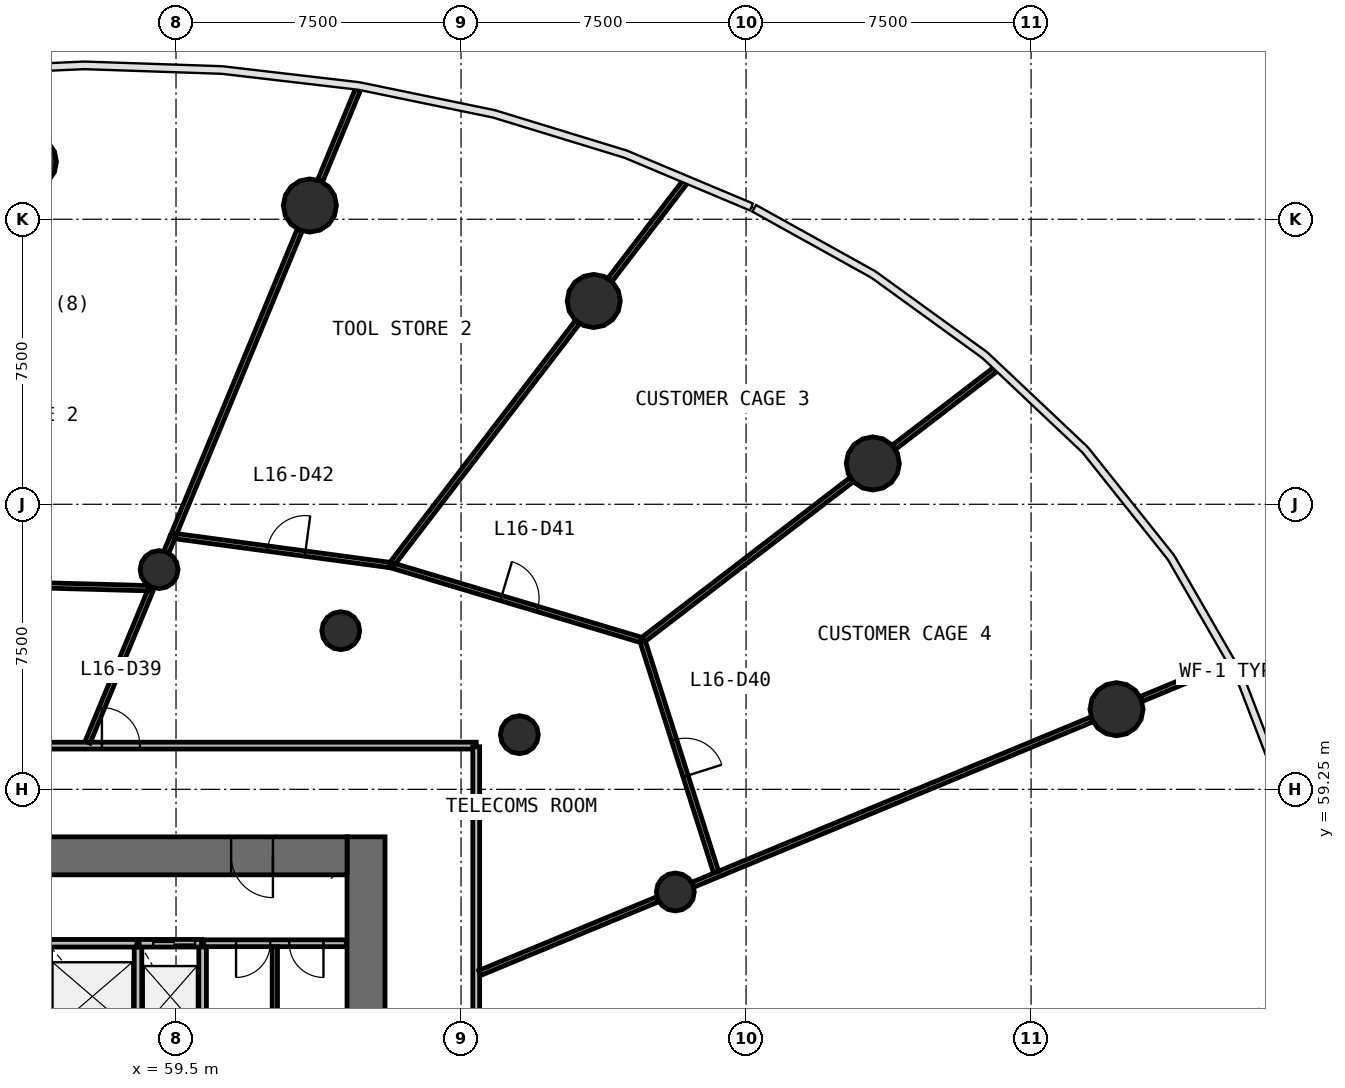
"""IFC4 building model, lengths in metres.
Left out: names, types, materials, properties, quantities, classifications, styles, units other than length and angle.
Written with IfcOpenShell. Run it as: python <this file> out.ifc"""

import sys

from ifc_helpers import new_model, si_unit, direction, frame, frame_2d, origin, origin_2d, place, context, subcontext, project, spatial, rectangle, circle, extrude, source, transform, mapped, element, fill, save


model = new_model("IFC4")
c1 = context("Model", 3, precision=1e-05, world=origin(), true_north=direction((0.0, 1.0)))
c2 = subcontext(c1, "Body", "Model", "MODEL_VIEW")
j1 = project(units=[si_unit("LENGTHUNIT", "METRE"), si_unit("PLANEANGLEUNIT", "RADIAN")], contexts=[c1])
p1 = place(None, origin())
s1 = spatial("IfcSite", under=j1, at=p1, CompositionType="ELEMENT")
p2 = place(p1, origin())
s2 = spatial("IfcBuilding", under=s1, at=p2, CompositionType="ELEMENT")
p3 = place(p2, frame((0.0, 0.0, 71.0)))
s3 = spatial("IfcBuildingStorey", under=s2, at=p3, CompositionType="ELEMENT", Elevation=71.0)
p4 = place(p3, frame((64.5, 38.0, 0.0), z_axis=(0.0, 0.0, 1.0), x_axis=(0.0, 1.0, 0.0)))
e1 = element("IfcWall", 1, at=p4, inside=s3, PredefinedType="SHEAR", context=c2, shape_type="SweptSolid", body=[
    extrude(rectangle(XDim=20.0, YDim=1.0, at=frame_2d((10.0, 0.0))), origin(), (0.0, 0.0, 1.0), 4.4),
])
p5 = place(p4, frame((9.1, 0.0, 0.0)))
e2 = element("IfcOpeningElement", 2, at=p5, cuts=e1, PredefinedType="OPENING", context=c2, shape_type="SweptSolid", body=[
    extrude(rectangle(XDim=1.8, YDim=2.1, at=frame_2d((0.9, 1.05))), frame((0.0, 0.51, 0.0), z_axis=(0.0, -1.0, 0.0), x_axis=(1.0, 0.0, 0.0)), (0.0, 0.0, 1.0), 1.02),
])
p6 = place(p3, frame((64.0, 57.5, 0.0), z_axis=(0.0, 0.0, 1.0), x_axis=(-1.0, 0.0, 0.0)))
e3 = element("IfcWall", 3, at=p6, inside=s3, PredefinedType="SHEAR", context=c2, shape_type="SweptSolid", body=[
    extrude(rectangle(XDim=24.0, YDim=1.0, at=frame_2d((12.0, 0.0))), origin(), (0.0, 0.0, 1.0), 4.4),
])
p7 = place(p6, frame((21.45, 0.0, 0.0)))
e4 = element("IfcOpeningElement", 4, at=p7, cuts=e3, PredefinedType="OPENING", context=c2, shape_type="SweptSolid", body=[
    extrude(rectangle(XDim=1.1, YDim=2.1, at=frame_2d((0.55, 1.05))), frame((0.0, 0.51, 0.0), z_axis=(0.0, -1.0, 0.0), x_axis=(1.0, 0.0, 0.0)), (0.0, 0.0, 1.0), 1.02),
])
p8 = place(p6, frame((1.95, 0.0, 0.0)))
e5 = element("IfcOpeningElement", 5, at=p8, cuts=e3, PredefinedType="OPENING", context=c2, shape_type="SweptSolid", body=[
    extrude(rectangle(XDim=1.1, YDim=2.1, at=frame_2d((0.55, 1.05))), frame((0.0, 0.51, 0.0), z_axis=(0.0, -1.0, 0.0), x_axis=(1.0, 0.0, 0.0)), (0.0, 0.0, 1.0), 1.02),
])
m1 = source(origin(), c2, "Body", "SweptSolid", [
    extrude(circle(Radius=0.7, at=origin_2d()), origin(), (0.0, 0.0, 1.0), 4.4),
])
for number, where, z_axis, x_axis in (
    (6, (84.249, 61.358, 0.0), (0.0, 0.0, 1.0), (1.0, 0.0, 0.0)),
    (7, (77.836, 67.824, 0.0), (0.0, 0.0, 1.0), (1.0, 0.0, 0.0)),
    (8, (70.492, 72.1, 0.0), (0.0, 0.0, 1.0), (1.0, 0.0, 0.0)),
    (9, (63.023, 74.611, 0.0), (0.0, 0.0, 1.0), (1.0, 0.0, 0.0)),
    (10, (55.655, 75.761, 0.0), (0.0, 0.0, 1.0), (1.0, 0.0, 0.0)),
):
    element("IfcColumn", number, at=place(p3, frame(where, z_axis=z_axis, x_axis=x_axis)), inside=s3, PredefinedType="COLUMN", context=c2, shape_type="MappedRepresentation", body=[
        mapped(m1, transform((0.0, 0.0, 0.0), scale=1.0)),
    ])
m2 = source(origin(), c2, "Body", "SweptSolid", [
    extrude(circle(Radius=0.5, at=origin_2d()), origin(), (0.0, 0.0, 1.0), 4.4),
])
for number, where, z_axis, x_axis in (
    (11, (72.639, 56.549, 0.0), (0.0, 0.0, 1.0), (1.0, 0.0, 0.0)),
    (12, (68.535, 60.688, 0.0), (0.0, 0.0, 1.0), (1.0, 0.0, 0.0)),
    (13, (63.835, 63.424, 0.0), (0.0, 0.0, 1.0), (1.0, 0.0, 0.0)),
    (14, (59.055, 65.031, 0.0), (0.0, 0.0, 1.0), (1.0, 0.0, 0.0)),
):
    element("IfcColumn", number, at=place(p3, frame(where, z_axis=z_axis, x_axis=x_axis)), inside=s3, PredefinedType="COLUMN", context=c2, shape_type="MappedRepresentation", body=[
        mapped(m2, transform((0.0, 0.0, 0.0), scale=1.0)),
    ])
for number, where, z_axis, x_axis in (
    (15, (58.5, 52.4, 0.0), (0.0, 0.0, 1.0), (0.0, 1.0, 0.0)),
    (16, (60.2, 52.4, 0.0), (0.0, 0.0, 1.0), (0.0, 1.0, 0.0)),
):
    element("IfcWall", number, at=place(p3, frame(where, z_axis=z_axis, x_axis=x_axis)), inside=s3, PredefinedType="SOLIDWALL", context=c2, shape_type="SweptSolid", body=[
        extrude(rectangle(XDim=2.8, YDim=0.2, at=frame_2d((1.4, 0.0))), origin(), (0.0, 0.0, 1.0), 3.9),
    ])
p9 = place(p3, frame((58.47, 55.2, 0.0), z_axis=(0.0, 0.0, 1.0), x_axis=(-1.0, 0.0, 0.0)))
e17 = element("IfcWall", 17, at=p9, inside=s3, PredefinedType="SOLIDWALL", context=c2, shape_type="SweptSolid", body=[
    extrude(rectangle(XDim=2.34, YDim=0.2, at=frame_2d((1.17, 0.0))), origin(), (0.0, 0.0, 1.0), 3.9),
])
p10 = place(p3, frame((60.17, 55.2, 0.0), z_axis=(0.0, 0.0, 1.0), x_axis=(-1.0, 0.0, 0.0)))
e18 = element("IfcWall", 18, at=p10, inside=s3, PredefinedType="SOLIDWALL", context=c2, shape_type="SweptSolid", body=[
    extrude(rectangle(XDim=1.64, YDim=0.2, at=frame_2d((0.82, 0.0))), origin(), (0.0, 0.0, 1.0), 3.9),
])
p11 = place(p10, frame((0.17, 0.0, 0.0)))
e19 = element("IfcOpeningElement", 19, at=p11, cuts=e18, PredefinedType="OPENING", context=c2, shape_type="SweptSolid", body=[
    extrude(rectangle(XDim=1.1, YDim=2.1, at=frame_2d((0.55, 1.05))), frame((0.0, 0.11, 0.0), z_axis=(0.0, -1.0, 0.0), x_axis=(1.0, 0.0, 0.0)), (0.0, 0.0, 1.0), 0.22),
])
p12 = place(p3, frame((36.6, 60.4, 0.0), z_axis=(0.0, 0.0, 1.0), x_axis=(1.0, 0.0, 0.0)))
e20 = element("IfcWall", 20, at=p12, inside=s3, PredefinedType="PARTITIONING", context=c2, shape_type="SweptSolid", body=[
    extrude(rectangle(XDim=30.8, YDim=0.18, at=frame_2d((15.4, 0.0))), origin(), (0.0, 0.0, 1.0), 3.0),
])
p13 = place(p12, frame((9.05, 0.0, 0.0)))
e21 = element("IfcOpeningElement", 21, at=p13, cuts=e20, PredefinedType="OPENING", context=c2, shape_type="SweptSolid", body=[
    extrude(rectangle(XDim=0.9, YDim=2.1, at=frame_2d((0.45, 1.05))), frame((0.0, 0.1, 0.0), z_axis=(0.0, -1.0, 0.0), x_axis=(1.0, 0.0, 0.0)), (0.0, 0.0, 1.0), 0.2),
])
p14 = place(p12, frame((6.05, 0.0, 0.0)))
e22 = element("IfcOpeningElement", 22, at=p14, cuts=e20, PredefinedType="OPENING", context=c2, shape_type="SweptSolid", body=[
    extrude(rectangle(XDim=0.9, YDim=2.1, at=frame_2d((0.45, 1.05))), frame((0.0, 0.1, 0.0), z_axis=(0.0, -1.0, 0.0), x_axis=(1.0, 0.0, 0.0)), (0.0, 0.0, 1.0), 0.2),
])
p15 = place(p12, frame((2.45, 0.0, 0.0)))
e23 = element("IfcOpeningElement", 23, at=p15, cuts=e20, PredefinedType="OPENING", context=c2, shape_type="SweptSolid", body=[
    extrude(rectangle(XDim=0.9, YDim=2.1, at=frame_2d((0.45, 1.05))), frame((0.0, 0.1, 0.0), z_axis=(0.0, -1.0, 0.0), x_axis=(1.0, 0.0, 0.0)), (0.0, 0.0, 1.0), 0.2),
])
p16 = place(p12, frame((20.95, 0.0, 0.0)))
e24 = element("IfcOpeningElement", 24, at=p16, cuts=e20, PredefinedType="OPENING", context=c2, shape_type="SweptSolid", body=[
    extrude(rectangle(XDim=1.0, YDim=2.1, at=frame_2d((0.5, 1.05))), frame((0.0, 0.1, 0.0), z_axis=(0.0, -1.0, 0.0), x_axis=(1.0, 0.0, 0.0)), (0.0, 0.0, 1.0), 0.2),
])
p17 = place(p12, frame((14.95, 0.0, 0.0)))
e25 = element("IfcOpeningElement", 25, at=p17, cuts=e20, PredefinedType="OPENING", context=c2, shape_type="SweptSolid", body=[
    extrude(rectangle(XDim=1.0, YDim=2.1, at=frame_2d((0.5, 1.05))), frame((0.0, 0.1, 0.0), z_axis=(0.0, -1.0, 0.0), x_axis=(1.0, 0.0, 0.0)), (0.0, 0.0, 1.0), 0.2),
])
p18 = place(p12, frame((12.55, 0.0, 0.0)))
e26 = element("IfcOpeningElement", 26, at=p18, cuts=e20, PredefinedType="OPENING", context=c2, shape_type="SweptSolid", body=[
    extrude(rectangle(XDim=1.0, YDim=2.1, at=frame_2d((0.5, 1.05))), frame((0.0, 0.1, 0.0), z_axis=(0.0, -1.0, 0.0), x_axis=(1.0, 0.0, 0.0)), (0.0, 0.0, 1.0), 0.2),
])
p19 = place(p3, frame((67.4, 60.37, 0.0), z_axis=(0.0, 0.0, 1.0), x_axis=(0.0, -1.0, 0.0)))
e27 = element("IfcWall", 27, at=p19, inside=s3, PredefinedType="PARTITIONING", context=c2, shape_type="SweptSolid", body=[
    extrude(rectangle(XDim=23.583, YDim=0.18, at=frame_2d((11.791, 0.0))), origin(), (0.0, 0.0, 1.0), 3.0),
])
p20 = place(p19, frame((14.732, 0.0, 0.0)))
e28 = element("IfcOpeningElement", 28, at=p20, cuts=e27, PredefinedType="OPENING", context=c2, shape_type="SweptSolid", body=[
    extrude(rectangle(XDim=1.0, YDim=2.1, at=frame_2d((0.5, 1.05))), frame((0.0, 0.1, 0.0), z_axis=(0.0, -1.0, 0.0), x_axis=(1.0, 0.0, 0.0)), (0.0, 0.0, 1.0), 0.2),
])
p21 = place(p19, frame((11.333, 0.0, 0.0)))
e29 = element("IfcOpeningElement", 29, at=p21, cuts=e27, PredefinedType="OPENING", context=c2, shape_type="SweptSolid", body=[
    extrude(rectangle(XDim=1.0, YDim=2.1, at=frame_2d((0.5, 1.05))), frame((0.0, 0.1, 0.0), z_axis=(0.0, -1.0, 0.0), x_axis=(1.0, 0.0, 0.0)), (0.0, 0.0, 1.0), 0.2),
])
p22 = place(p3, frame((63.98, 55.2, 0.0), z_axis=(0.0, 0.0, 1.0), x_axis=(-1.0, 0.0, 0.0)))
e30 = element("IfcWall", 30, at=p22, inside=s3, PredefinedType="PARTITIONING", context=c2, shape_type="SweptSolid", body=[
    extrude(rectangle(XDim=3.75, YDim=0.18, at=frame_2d((1.875, 0.0))), origin(), (0.0, 0.0, 1.0), 3.9),
])
p23 = place(p22, frame((2.0, 0.0, 0.0)))
e31 = element("IfcOpeningElement", 31, at=p23, cuts=e30, PredefinedType="OPENING", context=c2, shape_type="SweptSolid", body=[
    extrude(rectangle(XDim=0.9, YDim=2.1, at=frame_2d((0.45, 1.05))), frame((0.0, 0.1, 0.0), z_axis=(0.0, -1.0, 0.0), x_axis=(1.0, 0.0, 0.0)), (0.0, 0.0, 1.0), 0.2),
])
p24 = place(p22, frame((0.6, 0.0, 0.0)))
e32 = element("IfcOpeningElement", 32, at=p24, cuts=e30, PredefinedType="OPENING", context=c2, shape_type="SweptSolid", body=[
    extrude(rectangle(XDim=0.9, YDim=2.1, at=frame_2d((0.45, 1.05))), frame((0.0, 0.1, 0.0), z_axis=(0.0, -1.0, 0.0), x_axis=(1.0, 0.0, 0.0)), (0.0, 0.0, 1.0), 0.2),
])
p25 = place(p3, frame((73.106, 56.742, 0.0), z_axis=(0.0, 0.0, 1.0), x_axis=(0.923875075531, 0.382694192291, 0.0)))
e33 = element("IfcWall", 33, at=p25, inside=s3, PredefinedType="PARTITIONING", context=c2, shape_type="SweptSolid", body=[
    extrude(rectangle(XDim=11.356, YDim=0.14, at=frame_2d((5.678, 0.0))), origin(), (0.0, 0.0, 1.0), 3.0),
])
p26 = place(p3, frame((59.423, 65.92, 0.0), z_axis=(0.0, 0.0, 1.0), x_axis=(0.382676362581, 0.92388246088, 0.0)))
e34 = element("IfcWall", 34, at=p26, inside=s3, PredefinedType="PARTITIONING", context=c2, shape_type="SweptSolid", body=[
    extrude(rectangle(XDim=8.703, YDim=0.14, at=frame_2d((4.351, 0.0))), origin(), (0.0, 0.0, 1.0), 3.0),
])
p27 = place(p3, frame((65.158, 65.147, 0.0), z_axis=(0.0, 0.0, 1.0), x_axis=(0.608766021213, 0.793349816548, 0.0)))
e35 = element("IfcWall", 35, at=p27, inside=s3, PredefinedType="PARTITIONING", context=c2, shape_type="SweptSolid", body=[
    extrude(rectangle(XDim=8.059, YDim=0.14, at=frame_2d((4.029, 0.0))), origin(), (0.0, 0.0, 1.0), 3.0),
])
p28 = place(p3, frame((71.771, 63.171, 0.0), z_axis=(0.0, 0.0, 1.0), x_axis=(0.793362269214, 0.608749792433, 0.0)))
e36 = element("IfcWall", 36, at=p28, inside=s3, PredefinedType="PARTITIONING", context=c2, shape_type="SweptSolid", body=[
    extrude(rectangle(XDim=6.94, YDim=0.14, at=frame_2d((3.47, 0.0))), origin(), (0.0, 0.0, 1.0), 3.0),
])
p29 = place(p3, frame((65.229, 65.126, 0.0), z_axis=(0.0, 0.0, 1.0), x_axis=(0.95810065558, -0.286431726205, 0.0)))
e37 = element("IfcWall", 37, at=p29, inside=s3, PredefinedType="PARTITIONING", context=c2, shape_type="SweptSolid", body=[
    extrude(rectangle(XDim=6.798, YDim=0.14, at=frame_2d((3.399, 0.0))), origin(), (0.0, 0.0, 1.0), 3.0),
])
p30 = place(p29, frame((2.947, 0.0, 0.0)))
e38 = element("IfcOpeningElement", 38, at=p30, cuts=e37, PredefinedType="OPENING", context=c2, shape_type="SweptSolid", body=[
    extrude(rectangle(XDim=1.0, YDim=2.1, at=frame_2d((0.5, 1.05))), frame((0.0, 0.08, 0.0), z_axis=(0.0, -1.0, 0.0), x_axis=(1.0, 0.0, 0.0)), (0.0, 0.0, 1.0), 0.16),
])
p31 = place(p3, frame((71.78, 63.142, 0.0), z_axis=(0.0, 0.0, 1.0), x_axis=(0.303141987912, -0.952945399887, 0.0)))
e39 = element("IfcWall", 39, at=p31, inside=s3, PredefinedType="PARTITIONING", context=c2, shape_type="SweptSolid", body=[
    extrude(rectangle(XDim=6.373, YDim=0.14, at=frame_2d((3.187, 0.0))), origin(), (0.0, 0.0, 1.0), 3.0),
])
p32 = place(p31, frame((2.723, 0.0, 0.0)))
e40 = element("IfcOpeningElement", 40, at=p32, cuts=e39, PredefinedType="OPENING", context=c2, shape_type="SweptSolid", body=[
    extrude(rectangle(XDim=1.0, YDim=2.1, at=frame_2d((0.5, 1.05))), frame((0.0, 0.08, 0.0), z_axis=(0.0, -1.0, 0.0), x_axis=(1.0, 0.0, 0.0)), (0.0, 0.0, 1.0), 0.16),
])
p33 = place(p3, frame((59.494, 65.91, 0.0), z_axis=(0.0, 0.0, 1.0), x_axis=(0.991057166824, -0.133437970936, 0.0)))
e41 = element("IfcWall", 41, at=p33, inside=s3, PredefinedType="PARTITIONING", context=c2, shape_type="SweptSolid", body=[
    extrude(rectangle(XDim=5.685, YDim=0.14, at=frame_2d((2.842, 0.0))), origin(), (0.0, 0.0, 1.0), 3.0),
])
p34 = place(p33, frame((2.435, 0.0, 0.0)))
e42 = element("IfcOpeningElement", 42, at=p34, cuts=e41, PredefinedType="OPENING", context=c2, shape_type="SweptSolid", body=[
    extrude(rectangle(XDim=1.0, YDim=2.1, at=frame_2d((0.5, 1.05))), frame((0.0, 0.08, 0.0), z_axis=(0.0, -1.0, 0.0), x_axis=(1.0, 0.0, 0.0)), (0.0, 0.0, 1.0), 0.16),
])
p35 = place(p3, frame((67.49, 54.416, 0.0), z_axis=(0.0, 0.0, 1.0), x_axis=(0.923890025086, 0.382658100067, 0.0)))
e43 = element("IfcWall", 43, at=p35, inside=s3, PredefinedType="PARTITIONING", context=c2, shape_type="SweptSolid", body=[
    extrude(rectangle(XDim=5.068, YDim=0.14, at=frame_2d((2.534, 0.0))), origin(), (0.0, 0.0, 1.0), 3.0),
])
p36 = place(p3, frame((58.851, 64.54, 0.0), z_axis=(0.0, 0.0, 1.0), x_axis=(-0.999641405582, 0.026777980617, 0.0)))
e44 = element("IfcWall", 44, at=p36, inside=s3, PredefinedType="PARTITIONING", context=c2, shape_type="SweptSolid", body=[
    extrude(rectangle(XDim=4.659, YDim=0.14, at=frame_2d((2.33, 0.0))), origin(), (0.0, 0.0, 1.0), 3.0),
])
p37 = place(p3, frame((57.174, 60.49, 0.0), z_axis=(0.0, 0.0, 1.0), x_axis=(0.382647054989, 0.923894599675, 0.0)))
e45 = element("IfcWall", 45, at=p37, inside=s3, PredefinedType="PARTITIONING", context=c2, shape_type="SweptSolid", body=[
    extrude(rectangle(XDim=4.309, YDim=0.14, at=frame_2d((2.154, 0.0))), origin(), (0.0, 0.0, 1.0), 3.0),
])
p38 = place(p3, frame((78.394, 68.253, 0.0), z_axis=(0.0, 0.0, 1.0), x_axis=(0.793347702256, 0.608768776569, 0.0)))
e46 = element("IfcWall", 46, at=p38, inside=s3, PredefinedType="PARTITIONING", context=c2, shape_type="SweptSolid", body=[
    extrude(rectangle(XDim=3.358, YDim=0.14, at=frame_2d((1.679, 0.0))), origin(), (0.0, 0.0, 1.0), 3.0),
])
p39 = place(p3, frame((70.921, 72.658, 0.0), z_axis=(0.0, 0.0, 1.0), x_axis=(0.608787991926, 0.793332957141, 0.0)))
e47 = element("IfcWall", 47, at=p39, inside=s3, PredefinedType="PARTITIONING", context=c2, shape_type="SweptSolid", body=[
    extrude(rectangle(XDim=3.249, YDim=0.14, at=frame_2d((1.625, 0.0))), origin(), (0.0, 0.0, 1.0), 3.0),
])
p40 = place(p3, frame((62.1, 52.4, 0.0), z_axis=(0.0, 0.0, 1.0), x_axis=(0.0, 1.0, 0.0)))
e48 = element("IfcWall", 48, at=p40, inside=s3, PredefinedType="PARTITIONING", context=c2, shape_type="SweptSolid", body=[
    extrude(rectangle(XDim=2.71, YDim=0.14, at=frame_2d((1.355, 0.0))), origin(), (0.0, 0.0, 1.0), 3.0),
])
p41 = place(p3, frame((63.292, 75.263, 0.0), z_axis=(0.0, 0.0, 1.0), x_axis=(0.382735718693, 0.923857873072, 0.0)))
e49 = element("IfcWall", 49, at=p41, inside=s3, PredefinedType="PARTITIONING", context=c2, shape_type="SweptSolid", body=[
    extrude(rectangle(XDim=2.583, YDim=0.14, at=frame_2d((1.292, 0.0))), origin(), (0.0, 0.0, 1.0), 3.0),
])
p42 = place(p3, frame((84.9, 61.628, 0.0), z_axis=(0.0, 0.0, 1.0), x_axis=(0.92388481198, 0.382670686352, 0.0)))
e50 = element("IfcWall", 50, at=p42, inside=s3, PredefinedType="PARTITIONING", context=c2, shape_type="SweptSolid", body=[
    extrude(rectangle(XDim=2.479, YDim=0.14, at=frame_2d((1.24, 0.0))), origin(), (0.0, 0.0, 1.0), 3.0),
])
p43 = place(p3, frame((59.248, 65.498, 0.0), z_axis=(0.0, 0.0, 1.0), x_axis=(0.382705452121, 0.923870411322, 0.0)))
e51 = element("IfcWall", 51, at=p43, inside=s3, PredefinedType="PARTITIONING", context=c2, shape_type="SweptSolid", body=[
    extrude(rectangle(XDim=0.427, YDim=0.14, at=frame_2d((0.213, 0.0))), origin(), (0.0, 0.0, 1.0), 3.0),
])
m3 = source(origin(), c2, "Body", "SweptSolid", [
    extrude(rectangle(XDim=1.1, YDim=2.1, at=frame_2d((0.55, 1.05))), frame((0.0, 0.025, 0.0), z_axis=(0.0, -1.0, 0.0), x_axis=(1.0, 0.0, 0.0)), (0.0, 0.0, 1.0), 0.05),
])
p44 = place(p11, origin())
e52 = element("IfcDoor", 52, at=p44, inside=s3, OperationType="DOUBLE_DOOR_SLIDING", PredefinedType="USERDEFINED", context=c2, shape_type="MappedRepresentation", body=[
    mapped(m3, transform((0.0, 0.0, 0.0), scale=1.0)),
])
fill(e19, e52)
m4 = source(origin(), c2, "Body", "SweptSolid", [
    extrude(rectangle(XDim=1.1, YDim=2.1, at=frame_2d((0.55, 1.05))), frame((0.0, 0.025, 0.0), z_axis=(0.0, -1.0, 0.0), x_axis=(1.0, 0.0, 0.0)), (0.0, 0.0, 1.0), 0.05),
])
p45 = place(p8, origin())
e53 = element("IfcDoor", 53, at=p45, inside=s3, OperationType="SINGLE_SWING_LEFT", PredefinedType="DOOR", context=c2, shape_type="MappedRepresentation", body=[
    mapped(m4, transform((0.0, 0.0, 0.0), scale=1.0)),
])
fill(e5, e53)
m5 = source(origin(), c2, "Body", "SweptSolid", [
    extrude(rectangle(XDim=1.0, YDim=2.1, at=frame_2d((0.5, 1.05))), frame((0.0, 0.025, 0.0), z_axis=(0.0, -1.0, 0.0), x_axis=(1.0, 0.0, 0.0)), (0.0, 0.0, 1.0), 0.05),
])
p46 = place(p16, origin())
e54 = element("IfcDoor", 54, at=p46, inside=s3, OperationType="SINGLE_SWING_LEFT", PredefinedType="DOOR", context=c2, shape_type="MappedRepresentation", body=[
    mapped(m5, transform((0.0, 0.0, 0.0), scale=1.0)),
])
fill(e24, e54)
p47 = place(p32, origin())
e55 = element("IfcDoor", 55, at=p47, inside=s3, OperationType="SINGLE_SWING_RIGHT", PredefinedType="DOOR", context=c2, shape_type="MappedRepresentation", body=[
    mapped(m5, transform((0.0, 0.0, 0.0), scale=1.0)),
])
fill(e40, e55)
p48 = place(p30, origin())
e56 = element("IfcDoor", 56, at=p48, inside=s3, OperationType="SINGLE_SWING_LEFT", PredefinedType="DOOR", context=c2, shape_type="MappedRepresentation", body=[
    mapped(m5, transform((0.0, 0.0, 0.0), scale=1.0)),
])
fill(e38, e56)
p49 = place(p34, origin())
e57 = element("IfcDoor", 57, at=p49, inside=s3, OperationType="SINGLE_SWING_RIGHT", PredefinedType="DOOR", context=c2, shape_type="MappedRepresentation", body=[
    mapped(m5, transform((0.0, 0.0, 0.0), scale=1.0)),
])
fill(e42, e57)
m6 = source(origin(), c2, "Body", "SweptSolid", [
    extrude(rectangle(XDim=0.9, YDim=2.1, at=frame_2d((0.45, 1.05))), frame((0.0, 0.025, 0.0), z_axis=(0.0, -1.0, 0.0), x_axis=(1.0, 0.0, 0.0)), (0.0, 0.0, 1.0), 0.05),
])
p50 = place(p23, origin())
e58 = element("IfcDoor", 58, at=p50, inside=s3, OperationType="SINGLE_SWING_RIGHT", PredefinedType="DOOR", context=c2, shape_type="MappedRepresentation", body=[
    mapped(m6, transform((0.0, 0.0, 0.0), scale=1.0)),
])
fill(e31, e58)
p51 = place(p24, origin())
e59 = element("IfcDoor", 59, at=p51, inside=s3, OperationType="SINGLE_SWING_LEFT", PredefinedType="DOOR", context=c2, shape_type="MappedRepresentation", body=[
    mapped(m6, transform((0.0, 0.0, 0.0), scale=1.0)),
])
fill(e32, e59)
save(model, sys.argv[1])
